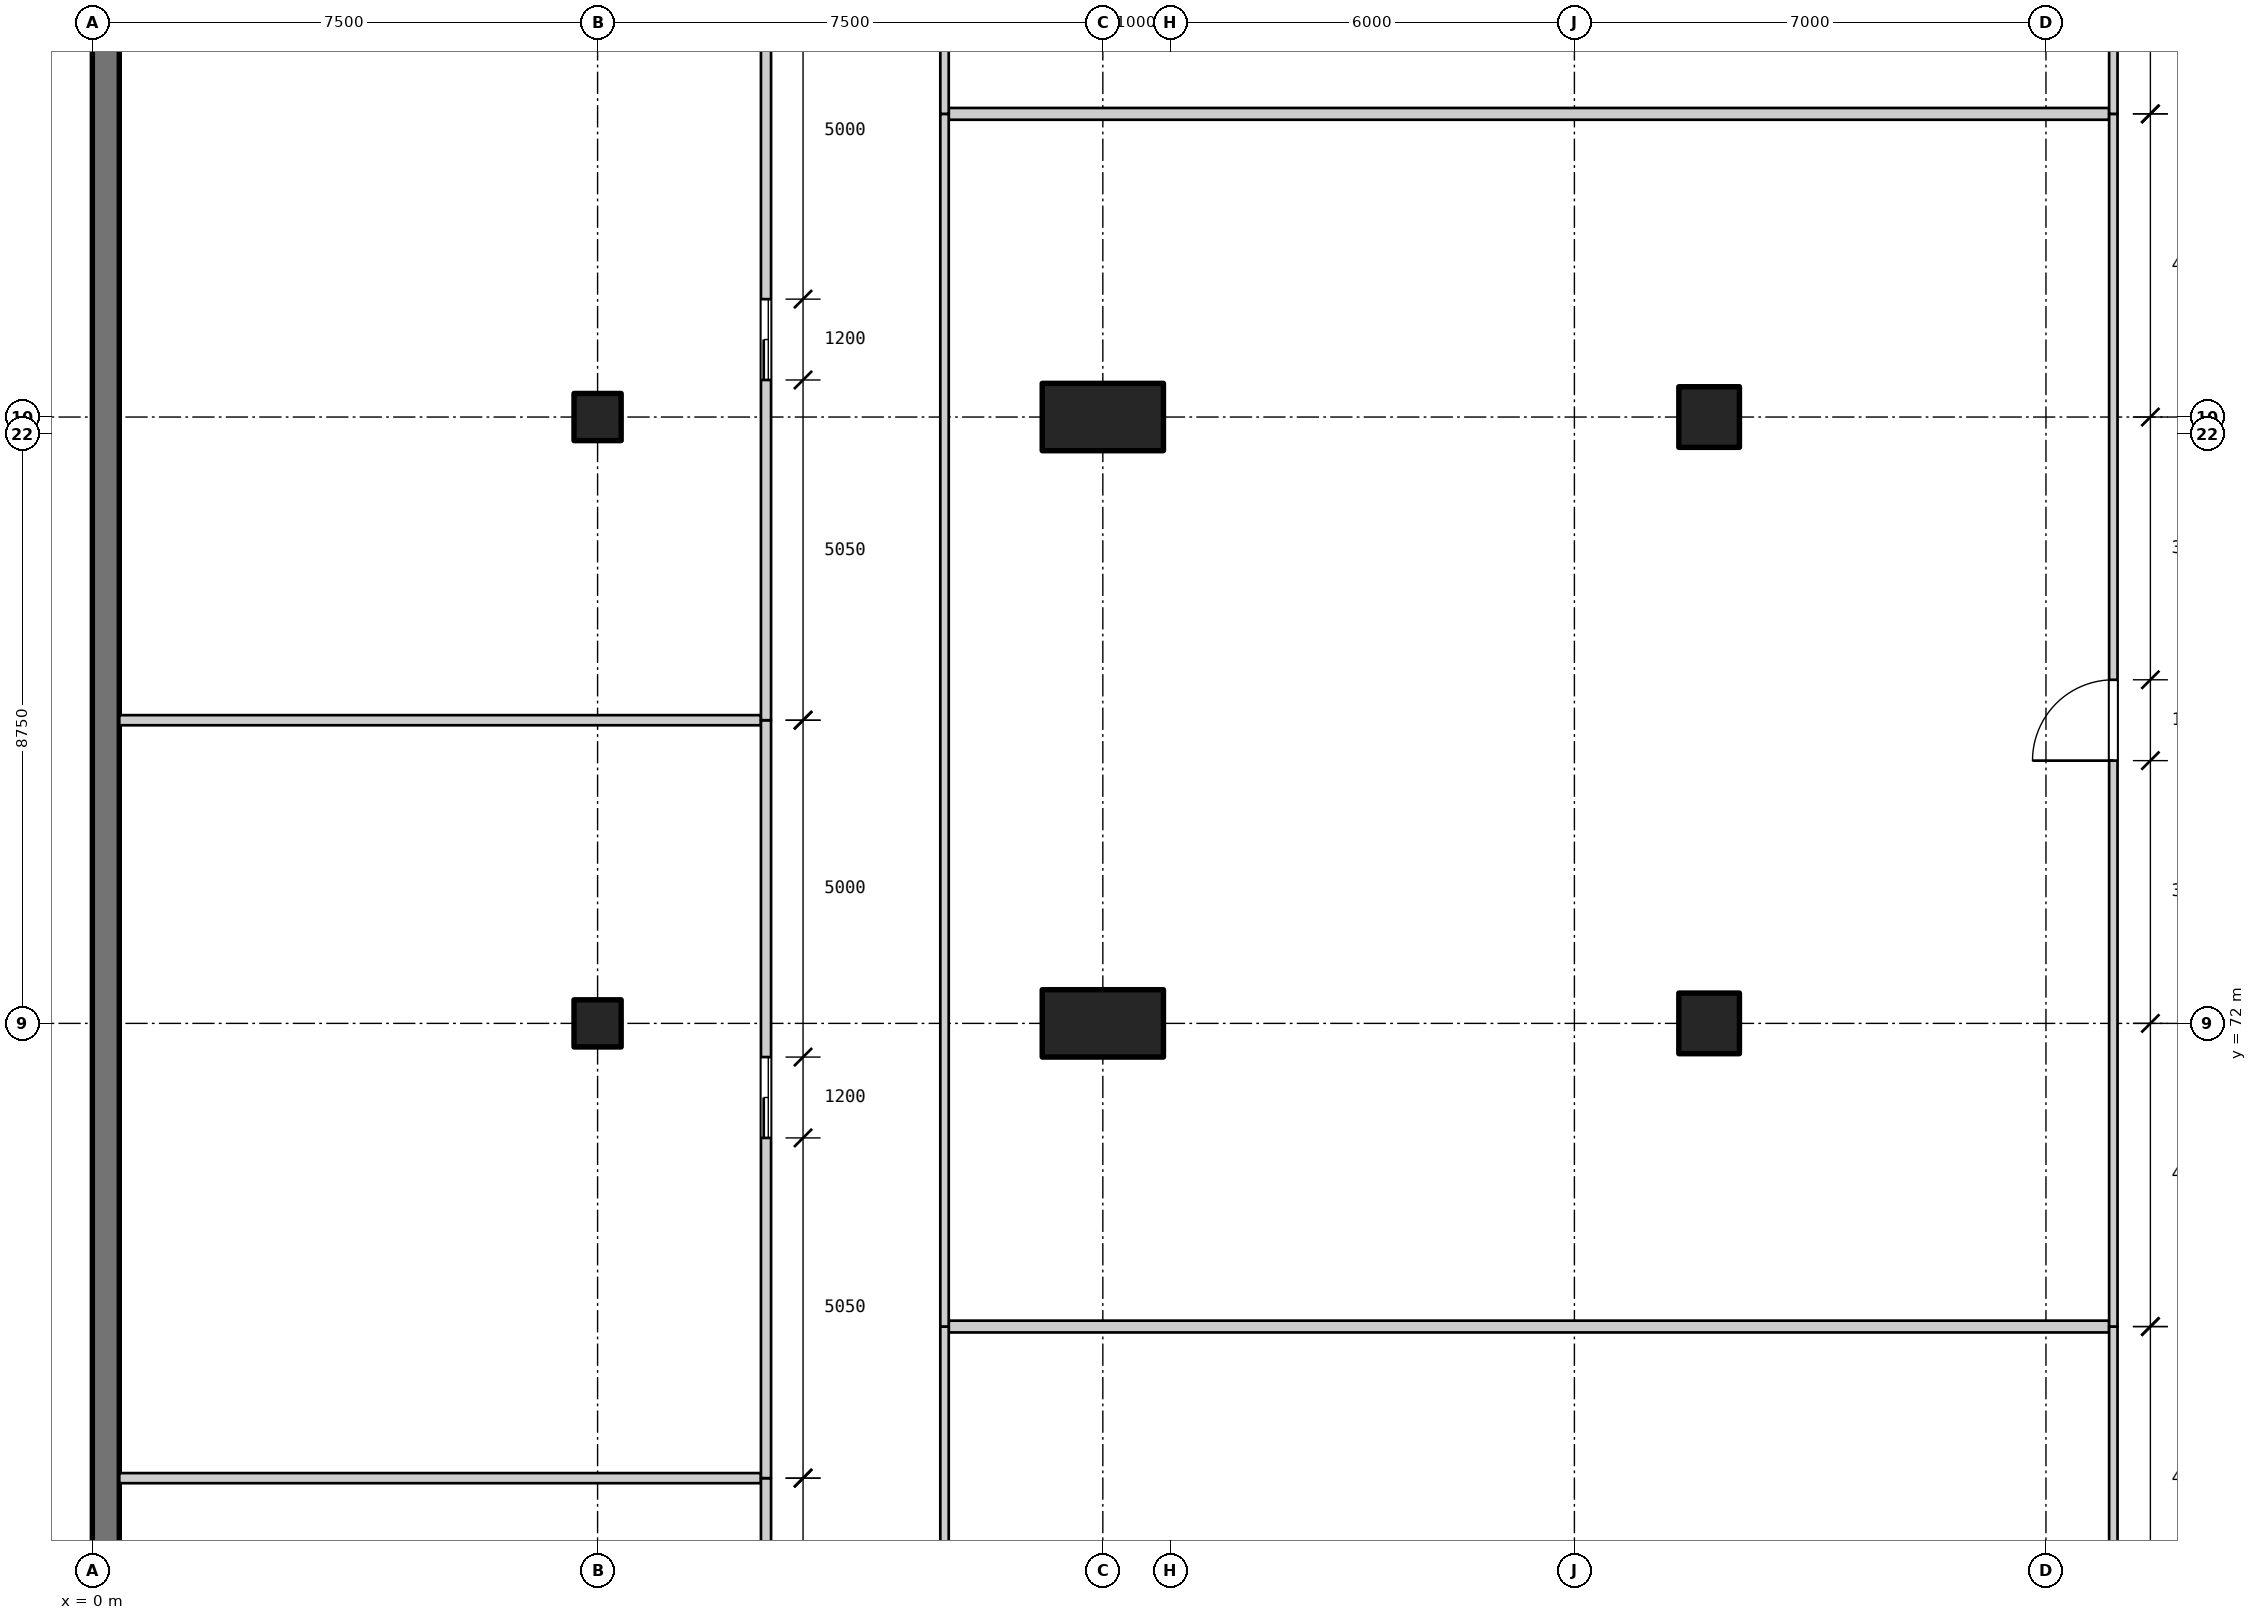
"""IFC4 building model, lengths in metres.
Left out: names, types, materials, properties, quantities, classifications, styles, units other than length and angle.
Written with IfcOpenShell. Run it as: python <this file> out.ifc"""

import sys

from ifc_helpers import new_model, si_unit, direction, frame, frame_2d, origin, origin_2d, place, context, subcontext, project, spatial, rectangle, extrude, element, fill, save


model = new_model("IFC4")
c1 = context("Model", 3, precision=1e-05, world=origin(), true_north=direction((0.0, 1.0)))
c2 = subcontext(c1, "Body", "Model", "MODEL_VIEW")
j1 = project(units=[si_unit("LENGTHUNIT", "METRE"), si_unit("PLANEANGLEUNIT", "RADIAN")], contexts=[c1])
p1 = place(None, origin())
s1 = spatial("IfcSite", under=j1, at=p1, CompositionType="ELEMENT")
p2 = place(p1, origin())
s2 = spatial("IfcBuilding", under=s1, at=p2, CompositionType="ELEMENT")
p3 = place(p2, frame((0.0, 0.0, -10.0)))
s3 = spatial("IfcBuildingStorey", under=s2, at=p3, CompositionType="ELEMENT", Elevation=-10.0)
for number, where, z_axis, x_axis in (
    (1, (24.0, 72.0, -1.4), (0.0, 0.0, 1.0), (1.0, 0.0, 0.0)),
    (2, (24.0, 81.0, -1.4), (0.0, 0.0, 1.0), (1.0, 0.0, 0.0)),
):
    element("IfcColumn", number, at=place(p3, frame(where, z_axis=z_axis, x_axis=x_axis)), inside=s3, PredefinedType="COLUMN", context=c2, shape_type="SweptSolid", body=[
        extrude(rectangle(XDim=0.9, YDim=0.9, at=origin_2d()), origin(), (0.0, 0.0, 1.0), 6.4),
    ])
for number, where, z_axis, x_axis in (
    (3, (7.5, 72.0, -1.4), (0.0, 0.0, 1.0), (1.0, 0.0, 0.0)),
    (4, (7.5, 81.0, -1.4), (0.0, 0.0, 1.0), (1.0, 0.0, 0.0)),
):
    element("IfcColumn", number, at=place(p3, frame(where, z_axis=z_axis, x_axis=x_axis)), inside=s3, PredefinedType="COLUMN", context=c2, shape_type="SweptSolid", body=[
        extrude(rectangle(XDim=0.7, YDim=0.7, at=origin_2d()), origin(), (0.0, 0.0, 1.0), 6.4),
    ])
p4 = place(p3, frame((0.2, 18.0, -1.4), z_axis=(0.0, 0.0, 1.0), x_axis=(0.0, 1.0, 0.0)))
e5 = element("IfcWall", 5, at=p4, inside=s3, PredefinedType="SOLIDWALL", context=c2, shape_type="SweptSolid", body=[
    extrude(rectangle(XDim=108.0, YDim=0.4, at=frame_2d((54.0, 0.0))), origin(), (0.0, 0.0, 1.0), 6.4),
])
for number, where, z_axis, x_axis in (
    (6, (15.0, 72.0, -1.4), (0.0, 0.0, 1.0), (1.0, 0.0, 0.0)),
    (7, (15.0, 81.0, -1.4), (0.0, 0.0, 1.0), (1.0, 0.0, 0.0)),
):
    element("IfcColumn", number, at=place(p3, frame(where, z_axis=z_axis, x_axis=x_axis)), inside=s3, PredefinedType="COLUMN", context=c2, shape_type="SweptSolid", body=[
        extrude(rectangle(XDim=1.8, YDim=1.0, at=origin_2d()), origin(), (0.0, 0.0, 1.0), 6.4),
    ])
p5 = place(p3, frame((0.4, 65.25, 0.0), z_axis=(0.0, 0.0, 1.0), x_axis=(1.0, 0.0, 0.0)))
e8 = element("IfcWall", 8, at=p5, inside=s3, PredefinedType="PARTITIONING", context=c2, shape_type="SweptSolid", body=[
    extrude(rectangle(XDim=9.525, YDim=0.15, at=frame_2d((4.763, 0.0))), origin(), (0.0, 0.0, 1.0), 4.75),
])
p6 = place(p3, frame((12.712, 67.5, 0.0), z_axis=(0.0, 0.0, 1.0), x_axis=(1.0, 0.0, 0.0)))
e9 = element("IfcWall", 9, at=p6, inside=s3, PredefinedType="PARTITIONING", context=c2, shape_type="SweptSolid", body=[
    extrude(rectangle(XDim=17.225, YDim=0.175, at=frame_2d((8.613, 0.0))), origin(), (0.0, 0.0, 1.0), 4.75),
])
p7 = place(p3, frame((0.4, 76.5, 0.0), z_axis=(0.0, 0.0, 1.0), x_axis=(1.0, 0.0, 0.0)))
e10 = element("IfcWall", 10, at=p7, inside=s3, PredefinedType="PARTITIONING", context=c2, shape_type="SweptSolid", body=[
    extrude(rectangle(XDim=9.525, YDim=0.15, at=frame_2d((4.763, 0.0))), origin(), (0.0, 0.0, 1.0), 4.75),
])
p8 = place(p3, frame((12.712, 85.5, 0.0), z_axis=(0.0, 0.0, 1.0), x_axis=(1.0, 0.0, 0.0)))
e11 = element("IfcWall", 11, at=p8, inside=s3, PredefinedType="PARTITIONING", context=c2, shape_type="SweptSolid", body=[
    extrude(rectangle(XDim=17.225, YDim=0.175, at=frame_2d((8.613, 0.0))), origin(), (0.0, 0.0, 1.0), 4.75),
])
p9 = place(p3, frame((10.0, 54.0, 0.0), z_axis=(0.0, 0.0, 1.0), x_axis=(0.0, 1.0, 0.0)))
e12 = element("IfcWall", 12, at=p9, inside=s3, PredefinedType="PARTITIONING", context=c2, shape_type="SweptSolid", body=[
    extrude(rectangle(XDim=11.25, YDim=0.15, at=frame_2d((5.625, 0.0))), origin(), (0.0, 0.0, 1.0), 4.75),
])
p10 = place(p9, frame((5.05, 0.0, 0.0)))
e13 = element("IfcOpeningElement", 13, at=p10, cuts=e12, PredefinedType="OPENING", context=c2, shape_type="SweptSolid", body=[
    extrude(rectangle(XDim=1.2, YDim=2.4, at=frame_2d((0.6, 1.2))), frame((0.0, 0.085, 0.0), z_axis=(0.0, -1.0, 0.0), x_axis=(1.0, 0.0, 0.0)), (0.0, 0.0, 1.0), 0.17),
])
p11 = place(p3, frame((10.0, 65.25, 0.0), z_axis=(0.0, 0.0, 1.0), x_axis=(0.0, 1.0, 0.0)))
e14 = element("IfcWall", 14, at=p11, inside=s3, PredefinedType="PARTITIONING", context=c2, shape_type="SweptSolid", body=[
    extrude(rectangle(XDim=11.25, YDim=0.15, at=frame_2d((5.625, 0.0))), origin(), (0.0, 0.0, 1.0), 4.75),
])
p12 = place(p11, frame((5.05, 0.0, 0.0)))
e15 = element("IfcOpeningElement", 15, at=p12, cuts=e14, PredefinedType="OPENING", context=c2, shape_type="SweptSolid", body=[
    extrude(rectangle(XDim=1.2, YDim=2.4, at=frame_2d((0.6, 1.2))), frame((0.0, 0.085, 0.0), z_axis=(0.0, -1.0, 0.0), x_axis=(1.0, 0.0, 0.0)), (0.0, 0.0, 1.0), 0.17),
])
p13 = place(p3, frame((10.0, 76.5, 0.0), z_axis=(0.0, 0.0, 1.0), x_axis=(0.0, 1.0, 0.0)))
e16 = element("IfcWall", 16, at=p13, inside=s3, PredefinedType="PARTITIONING", context=c2, shape_type="SweptSolid", body=[
    extrude(rectangle(XDim=11.25, YDim=0.15, at=frame_2d((5.625, 0.0))), origin(), (0.0, 0.0, 1.0), 4.75),
])
p14 = place(p13, frame((5.05, 0.0, 0.0)))
e17 = element("IfcOpeningElement", 17, at=p14, cuts=e16, PredefinedType="OPENING", context=c2, shape_type="SweptSolid", body=[
    extrude(rectangle(XDim=1.2, YDim=2.4, at=frame_2d((0.6, 1.2))), frame((0.0, 0.085, 0.0), z_axis=(0.0, -1.0, 0.0), x_axis=(1.0, 0.0, 0.0)), (0.0, 0.0, 1.0), 0.17),
])
for number, where, z_axis, x_axis in (
    (18, (12.65, 49.5, 0.0), (0.0, 0.0, 1.0), (0.0, 1.0, 0.0)),
    (19, (12.65, 67.5, 0.0), (0.0, 0.0, 1.0), (0.0, 1.0, 0.0)),
):
    element("IfcWall", number, at=place(p3, frame(where, z_axis=z_axis, x_axis=x_axis)), inside=s3, PredefinedType="PARTITIONING", context=c2, shape_type="SweptSolid", body=[
        extrude(rectangle(XDim=18.0, YDim=0.125, at=frame_2d((9.0, 0.0))), origin(), (0.0, 0.0, 1.0), 4.75),
    ])
p15 = place(p3, frame((12.65, 85.5, 0.0), z_axis=(0.0, 0.0, 1.0), x_axis=(0.0, 1.0, 0.0)))
e20 = element("IfcWall", 20, at=p15, inside=s3, PredefinedType="PARTITIONING", context=c2, shape_type="SweptSolid", body=[
    extrude(rectangle(XDim=13.5, YDim=0.125, at=frame_2d((6.75, 0.0))), origin(), (0.0, 0.0, 1.0), 4.75),
])
p16 = place(p3, frame((30.0, 49.5, 0.0), z_axis=(0.0, 0.0, 1.0), x_axis=(0.0, 1.0, 0.0)))
e21 = element("IfcWall", 21, at=p16, inside=s3, PredefinedType="PARTITIONING", context=c2, shape_type="SweptSolid", body=[
    extrude(rectangle(XDim=18.0, YDim=0.125, at=frame_2d((9.0, 0.0))), origin(), (0.0, 0.0, 1.0), 4.75),
])
p17 = place(p16, frame((8.4, 0.0, 0.0)))
e22 = element("IfcOpeningElement", 22, at=p17, cuts=e21, PredefinedType="OPENING", context=c2, shape_type="SweptSolid", body=[
    extrude(rectangle(XDim=1.2, YDim=2.1, at=frame_2d((0.6, 1.05))), frame((0.0, 0.073, 0.0), z_axis=(0.0, -1.0, 0.0), x_axis=(1.0, 0.0, 0.0)), (0.0, 0.0, 1.0), 0.145),
])
p18 = place(p3, frame((30.0, 67.5, 0.0), z_axis=(0.0, 0.0, 1.0), x_axis=(0.0, 1.0, 0.0)))
e23 = element("IfcWall", 23, at=p18, inside=s3, PredefinedType="PARTITIONING", context=c2, shape_type="SweptSolid", body=[
    extrude(rectangle(XDim=18.0, YDim=0.125, at=frame_2d((9.0, 0.0))), origin(), (0.0, 0.0, 1.0), 4.75),
])
p19 = place(p18, frame((8.4, 0.0, 0.0)))
e24 = element("IfcOpeningElement", 24, at=p19, cuts=e23, PredefinedType="OPENING", context=c2, shape_type="SweptSolid", body=[
    extrude(rectangle(XDim=1.2, YDim=2.1, at=frame_2d((0.6, 1.05))), frame((0.0, 0.073, 0.0), z_axis=(0.0, -1.0, 0.0), x_axis=(1.0, 0.0, 0.0)), (0.0, 0.0, 1.0), 0.145),
])
p20 = place(p3, frame((30.0, 85.5, 0.0), z_axis=(0.0, 0.0, 1.0), x_axis=(0.0, 1.0, 0.0)))
e25 = element("IfcWall", 25, at=p20, inside=s3, PredefinedType="PARTITIONING", context=c2, shape_type="SweptSolid", body=[
    extrude(rectangle(XDim=13.5, YDim=0.125, at=frame_2d((6.75, 0.0))), origin(), (0.0, 0.0, 1.0), 4.75),
])
p21 = place(p20, frame((6.15, 0.0, 0.0)))
e26 = element("IfcOpeningElement", 26, at=p21, cuts=e25, PredefinedType="OPENING", context=c2, shape_type="SweptSolid", body=[
    extrude(rectangle(XDim=1.2, YDim=2.1, at=frame_2d((0.6, 1.05))), frame((0.0, 0.073, 0.0), z_axis=(0.0, -1.0, 0.0), x_axis=(1.0, 0.0, 0.0)), (0.0, 0.0, 1.0), 0.145),
])
p22 = place(p12, origin())
e27 = element("IfcDoor", 27, at=p22, inside=s3, OperationType="SLIDING_TO_LEFT", PredefinedType="DOOR", context=c2, shape_type="SweptSolid", body=[
    extrude(rectangle(XDim=1.2, YDim=2.4, at=frame_2d((0.6, 1.2))), frame((0.0, 0.025, 0.0), z_axis=(0.0, -1.0, 0.0), x_axis=(1.0, 0.0, 0.0)), (0.0, 0.0, 1.0), 0.05),
])
fill(e15, e27)
p23 = place(p19, origin())
e28 = element("IfcDoor", 28, at=p23, inside=s3, OperationType="SINGLE_SWING_LEFT", PredefinedType="DOOR", context=c2, shape_type="SweptSolid", body=[
    extrude(rectangle(XDim=1.2, YDim=2.1, at=frame_2d((0.6, 1.05))), frame((0.0, 0.025, 0.0), z_axis=(0.0, -1.0, 0.0), x_axis=(1.0, 0.0, 0.0)), (0.0, 0.0, 1.0), 0.05),
])
fill(e24, e28)
p24 = place(p14, origin())
e29 = element("IfcDoor", 29, at=p24, inside=s3, OperationType="SLIDING_TO_LEFT", PredefinedType="DOOR", context=c2, shape_type="SweptSolid", body=[
    extrude(rectangle(XDim=1.2, YDim=2.4, at=frame_2d((0.6, 1.2))), frame((0.0, 0.025, 0.0), z_axis=(0.0, -1.0, 0.0), x_axis=(1.0, 0.0, 0.0)), (0.0, 0.0, 1.0), 0.05),
])
fill(e17, e29)
save(model, sys.argv[1])
